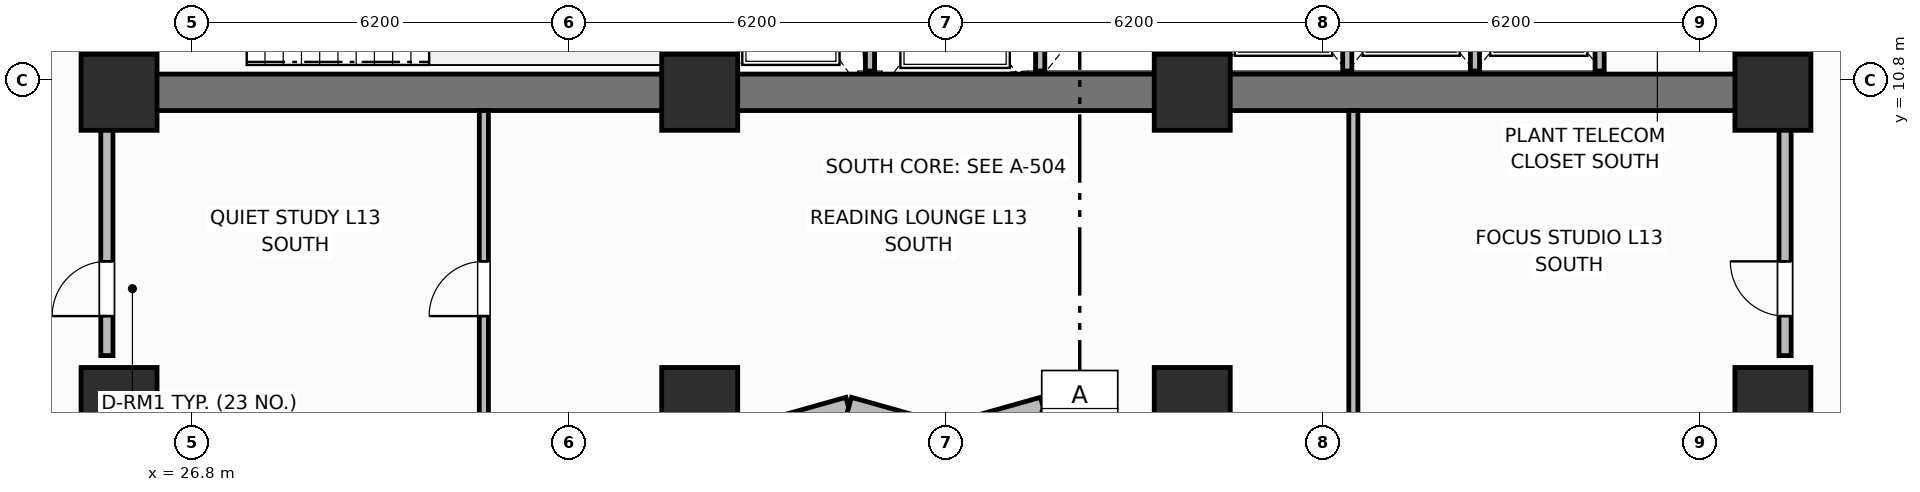
"""IFC4 building model, lengths in metres.
Left out: names, types, materials, properties, quantities, classifications, styles, units other than length and angle.
Written with IfcOpenShell. Run it as: python <this file> out.ifc"""

import sys

from ifc_helpers import new_model, si_unit, direction, frame, frame_2d, origin, origin_2d, place, context, subcontext, project, spatial, rectangle, extrude, element, fill, save


model = new_model("IFC4")
c1 = context("Model", 3, precision=1e-05, world=origin(), true_north=direction((0.0, 1.0)))
c2 = subcontext(c1, "Body", "Model", "MODEL_VIEW")
j1 = project(units=[si_unit("LENGTHUNIT", "METRE"), si_unit("PLANEANGLEUNIT", "RADIAN")], contexts=[c1])
p1 = place(None, origin())
s1 = spatial("IfcSite", under=j1, at=p1, CompositionType="ELEMENT")
p2 = place(p1, origin())
s2 = spatial("IfcBuilding", under=s1, at=p2, CompositionType="ELEMENT")
p3 = place(p2, frame((0.0, 0.0, 54.7)))
s3 = spatial("IfcBuildingStorey", under=s2, at=p3, CompositionType="ELEMENT", Elevation=54.7)
p4 = place(p3, frame((52.8, 10.6, 0.0), z_axis=(0.0, 0.0, 1.0), x_axis=(-1.0, 0.0, 0.0)))
e1 = element("IfcWall", 1, at=p4, inside=s3, PredefinedType="SHEAR", context=c2, shape_type="SweptSolid", body=[
    extrude(rectangle(XDim=27.2, YDim=0.6, at=frame_2d((13.6, 0.0))), origin(), (0.0, 0.0, 1.0), 3.7),
])
for number, where, z_axis, x_axis in (
    (2, (25.6, 10.9, 0.0), (0.0, 0.0, 1.0), (0.0, 1.0, 0.0)),
    (3, (52.8, 10.9, 0.0), (0.0, 0.0, 1.0), (0.0, 1.0, 0.0)),
):
    element("IfcWall", number, at=place(p3, frame(where, z_axis=z_axis, x_axis=x_axis)), inside=s3, PredefinedType="SHEAR", context=c2, shape_type="SweptSolid", body=[
        extrude(rectangle(XDim=5.6, YDim=0.6, at=frame_2d((2.8, 0.0))), origin(), (0.0, 0.0, 1.0), 3.7),
    ])
for number, where, z_axis, x_axis in (
    (4, (35.15, 10.9, 0.0), (0.0, 0.0, 1.0), (0.0, 1.0, 0.0)),
    (5, (43.25, 10.9, 0.0), (0.0, 0.0, 1.0), (0.0, 1.0, 0.0)),
):
    element("IfcWall", number, at=place(p3, frame(where, z_axis=z_axis, x_axis=x_axis)), inside=s3, PredefinedType="SHEAR", context=c2, shape_type="SweptSolid", body=[
        extrude(rectangle(XDim=5.6, YDim=0.4, at=frame_2d((2.8, 0.0))), origin(), (0.0, 0.0, 1.0), 3.7),
    ])
for number, where, z_axis, x_axis in (
    (6, (25.6, 10.6, 0.0), (0.0, 0.0, 1.0), (1.0, 0.0, 0.0)),
    (7, (35.15, 10.6, 0.0), (0.0, 0.0, 1.0), (1.0, 0.0, 0.0)),
    (8, (43.25, 10.6, 0.0), (0.0, 0.0, 1.0), (1.0, 0.0, 0.0)),
    (9, (52.8, 10.6, 0.0), (0.0, 0.0, 1.0), (1.0, 0.0, 0.0)),
    (10, (25.6, 5.45, 0.0), (0.0, 0.0, 1.0), (1.0, 0.0, 0.0)),
    (11, (35.15, 5.45, 0.0), (0.0, 0.0, 1.0), (1.0, 0.0, 0.0)),
    (12, (43.25, 5.45, 0.0), (0.0, 0.0, 1.0), (1.0, 0.0, 0.0)),
    (13, (52.8, 5.45, 0.0), (0.0, 0.0, 1.0), (1.0, 0.0, 0.0)),
):
    element("IfcColumn", number, at=place(p3, frame(where, z_axis=z_axis, x_axis=x_axis)), inside=s3, PredefinedType="COLUMN", context=c2, shape_type="SweptSolid", body=[
        extrude(rectangle(XDim=1.25, YDim=1.25, at=origin_2d()), origin(), (0.0, 0.0, 1.0), 3.7),
    ])
p5 = place(p3, frame((36.0, 4.97, 0.0), z_axis=(0.0, 0.0, 1.0), x_axis=(0.962662902433, 0.270703040766, 0.0)))
e14 = element("IfcWall", 14, at=p5, inside=s3, PredefinedType="SOLIDWALL", context=c2, shape_type="SweptSolid", body=[
    extrude(rectangle(XDim=1.662, YDim=0.34, at=frame_2d((0.831, 0.0))), origin(), (0.0, 0.0, 1.0), 2.7),
])
p6 = place(p3, frame((37.6, 5.42, 0.0), z_axis=(0.0, 0.0, 1.0), x_axis=(0.962652136636, -0.270741322725, 0.0)))
e15 = element("IfcWall", 15, at=p6, inside=s3, PredefinedType="SOLIDWALL", context=c2, shape_type="SweptSolid", body=[
    extrude(rectangle(XDim=1.662, YDim=0.34, at=frame_2d((0.831, 0.0))), origin(), (0.0, 0.0, 1.0), 2.7),
])
p7 = place(p3, frame((39.2, 4.97, 0.0), z_axis=(0.0, 0.0, 1.0), x_axis=(0.962662902433, 0.270703040766, 0.0)))
e16 = element("IfcWall", 16, at=p7, inside=s3, PredefinedType="SOLIDWALL", context=c2, shape_type="SweptSolid", body=[
    extrude(rectangle(XDim=1.662, YDim=0.34, at=frame_2d((0.831, 0.0))), origin(), (0.0, 0.0, 1.0), 2.7),
])
p8 = place(p3, frame((40.8, 5.42, 0.0), z_axis=(0.0, 0.0, 1.0), x_axis=(0.962652136636, -0.270741322725, 0.0)))
e17 = element("IfcWall", 17, at=p8, inside=s3, PredefinedType="SOLIDWALL", context=c2, shape_type="SweptSolid", body=[
    extrude(rectangle(XDim=1.662, YDim=0.34, at=frame_2d((0.831, 0.0))), origin(), (0.0, 0.0, 1.0), 2.7),
])
for number, where, z_axis, x_axis in (
    (18, (37.95, 10.95, 0.0), (0.0, 0.0, 1.0), (0.0, 1.0, 0.0)),
    (19, (40.75, 10.95, 0.0), (0.0, 0.0, 1.0), (0.0, 1.0, 0.0)),
):
    element("IfcWall", number, at=place(p3, frame(where, z_axis=z_axis, x_axis=x_axis)), inside=s3, PredefinedType="PARTITIONING", context=c2, shape_type="SweptSolid", body=[
        extrude(rectangle(XDim=2.75, YDim=0.15, at=frame_2d((1.375, 0.0))), origin(), (0.0, 0.0, 1.0), 2.53),
    ])
for number, where, z_axis, x_axis in (
    (20, (45.8, 10.95, 0.0), (0.0, 0.0, 1.0), (0.0, 1.0, 0.0)),
    (21, (47.9, 10.95, 0.0), (0.0, 0.0, 1.0), (0.0, 1.0, 0.0)),
    (22, (49.95, 10.95, 0.0), (0.0, 0.0, 1.0), (0.0, 1.0, 0.0)),
):
    element("IfcWall", number, at=place(p3, frame(where, z_axis=z_axis, x_axis=x_axis)), inside=s3, PredefinedType="PARTITIONING", context=c2, shape_type="SweptSolid", body=[
        extrude(rectangle(XDim=2.7, YDim=0.15, at=frame_2d((1.35, 0.0))), origin(), (0.0, 0.0, 1.0), 2.53),
    ])
p9 = place(p3, frame((31.6, 4.97, 0.0), z_axis=(0.0, 0.0, 1.0), x_axis=(0.0, 1.0, 0.0)))
e23 = element("IfcWall", 23, at=p9, inside=s3, PredefinedType="PARTITIONING", context=c2, shape_type="SweptSolid", body=[
    extrude(rectangle(XDim=5.33, YDim=0.15, at=frame_2d((2.665, 0.0))), origin(), (0.0, 0.0, 1.0), 2.53),
])
p10 = place(p9, frame((1.95, 0.0, 0.0)))
e24 = element("IfcOpeningElement", 24, at=p10, cuts=e23, PredefinedType="OPENING", context=c2, shape_type="SweptSolid", body=[
    extrude(rectangle(XDim=0.9, YDim=2.1, at=frame_2d((0.45, 1.05))), frame((0.0, 0.085, 0.0), z_axis=(0.0, -1.0, 0.0), x_axis=(1.0, 0.0, 0.0)), (0.0, 0.0, 1.0), 0.17),
])
p11 = place(p3, frame((45.9, 4.97, 0.0), z_axis=(0.0, 0.0, 1.0), x_axis=(0.0, 1.0, 0.0)))
e25 = element("IfcWall", 25, at=p11, inside=s3, PredefinedType="PARTITIONING", context=c2, shape_type="SweptSolid", body=[
    extrude(rectangle(XDim=5.33, YDim=0.15, at=frame_2d((2.665, 0.0))), origin(), (0.0, 0.0, 1.0), 2.53),
])
p12 = place(p3, frame((25.4, 6.27, 0.0), z_axis=(0.0, 0.0, 1.0), x_axis=(0.0, 1.0, 0.0)))
e26 = element("IfcWall", 26, at=p12, inside=s3, PredefinedType="PARTITIONING", context=c2, shape_type="SweptSolid", body=[
    extrude(rectangle(XDim=4.03, YDim=0.2, at=frame_2d((2.015, 0.0))), origin(), (0.0, 0.0, 1.0), 2.53),
])
p13 = place(p12, frame((0.65, 0.0, 0.0)))
e27 = element("IfcOpeningElement", 27, at=p13, cuts=e26, PredefinedType="OPENING", context=c2, shape_type="SweptSolid", body=[
    extrude(rectangle(XDim=0.9, YDim=2.1, at=frame_2d((0.45, 1.05))), frame((0.0, 0.11, 0.0), z_axis=(0.0, -1.0, 0.0), x_axis=(1.0, 0.0, 0.0)), (0.0, 0.0, 1.0), 0.22),
])
p14 = place(p3, frame((53.0, 6.27, 0.0), z_axis=(0.0, 0.0, 1.0), x_axis=(0.0, 1.0, 0.0)))
e28 = element("IfcWall", 28, at=p14, inside=s3, PredefinedType="PARTITIONING", context=c2, shape_type="SweptSolid", body=[
    extrude(rectangle(XDim=4.03, YDim=0.2, at=frame_2d((2.015, 0.0))), origin(), (0.0, 0.0, 1.0), 2.53),
])
p15 = place(p14, frame((0.65, 0.0, 0.0)))
e29 = element("IfcOpeningElement", 29, at=p15, cuts=e28, PredefinedType="OPENING", context=c2, shape_type="SweptSolid", body=[
    extrude(rectangle(XDim=0.9, YDim=2.1, at=frame_2d((0.45, 1.05))), frame((0.0, 0.11, 0.0), z_axis=(0.0, -1.0, 0.0), x_axis=(1.0, 0.0, 0.0)), (0.0, 0.0, 1.0), 0.22),
])
p16 = place(p10, origin())
e30 = element("IfcDoor", 30, at=p16, inside=s3, OperationType="SINGLE_SWING_LEFT", PredefinedType="DOOR", context=c2, shape_type="SweptSolid", body=[
    extrude(rectangle(XDim=0.9, YDim=2.1, at=frame_2d((0.45, 1.05))), frame((0.0, 0.025, 0.0), z_axis=(0.0, -1.0, 0.0), x_axis=(1.0, 0.0, 0.0)), (0.0, 0.0, 1.0), 0.05),
])
fill(e24, e30)
p17 = place(p13, origin())
e31 = element("IfcDoor", 31, at=p17, inside=s3, OperationType="SINGLE_SWING_LEFT", PredefinedType="DOOR", context=c2, shape_type="SweptSolid", body=[
    extrude(rectangle(XDim=0.9, YDim=2.1, at=frame_2d((0.45, 1.05))), frame((0.0, 0.025, 0.0), z_axis=(0.0, -1.0, 0.0), x_axis=(1.0, 0.0, 0.0)), (0.0, 0.0, 1.0), 0.05),
])
fill(e27, e31)
p18 = place(p15, origin())
e32 = element("IfcDoor", 32, at=p18, inside=s3, OperationType="SINGLE_SWING_RIGHT", PredefinedType="DOOR", context=c2, shape_type="SweptSolid", body=[
    extrude(rectangle(XDim=0.9, YDim=2.1, at=frame_2d((0.45, 1.05))), frame((0.0, 0.025, 0.0), z_axis=(0.0, -1.0, 0.0), x_axis=(1.0, 0.0, 0.0)), (0.0, 0.0, 1.0), 0.05),
])
fill(e29, e32)
save(model, sys.argv[1])
